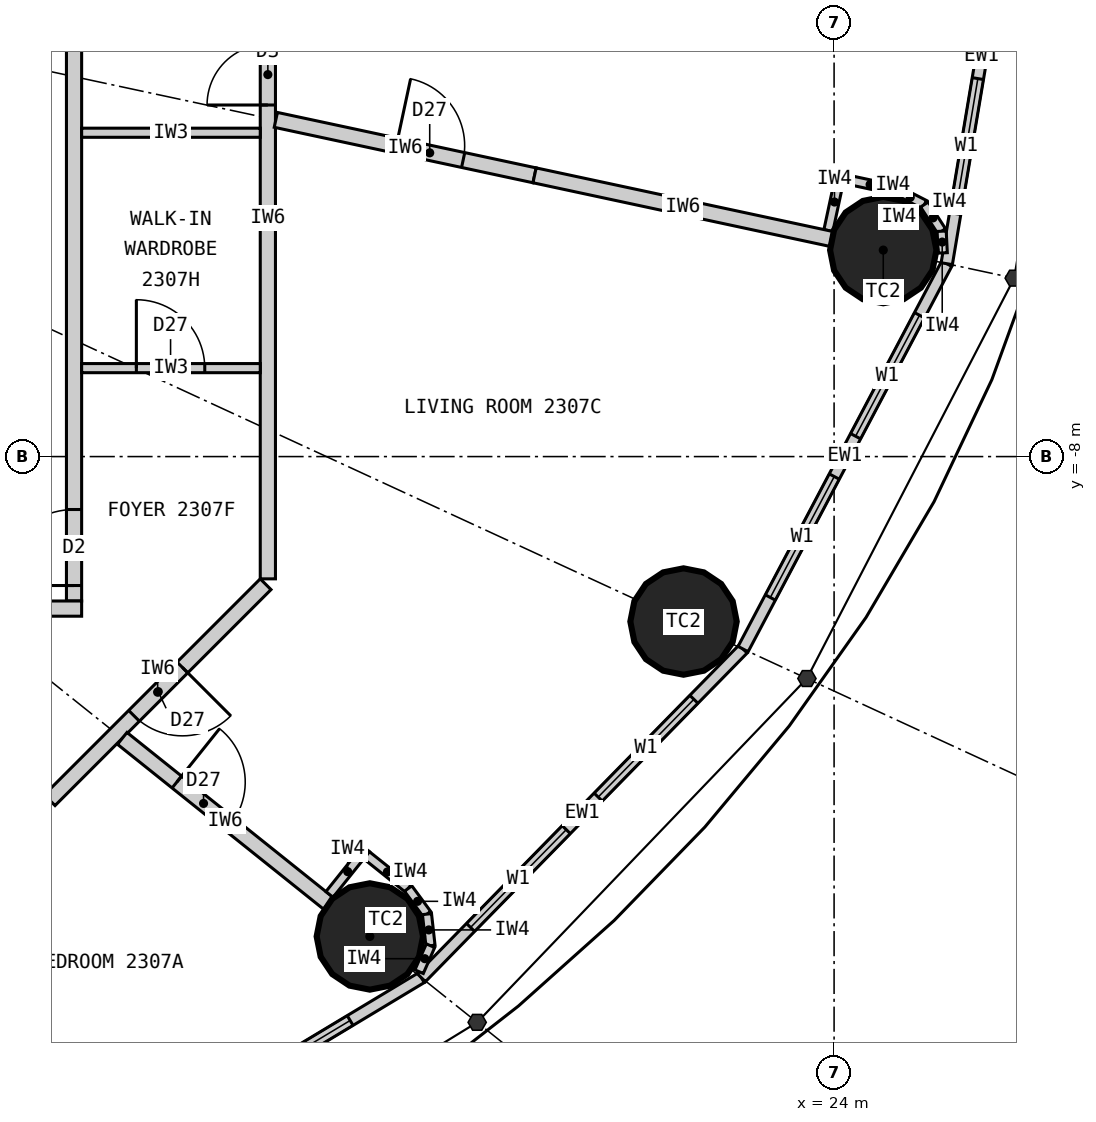
"""IFC4 building model, lengths in metres.
Left out: names, types, materials, properties, quantities, classifications, styles, units other than length and angle.
Written with IfcOpenShell. Run it as: python <this file> out.ifc"""

import sys

from ifc_helpers import new_model, si_unit, direction, frame, frame_2d, origin, origin_2d, place, context, subcontext, project, spatial, rectangle, circle, extrude, clip, halfspace, element, fill, save


model = new_model("IFC4")
c1 = context("Model", 3, precision=1e-05, world=origin(), true_north=direction((0.0, 1.0)))
c2 = subcontext(c1, "Body", "Model", "MODEL_VIEW")
j1 = project(units=[si_unit("LENGTHUNIT", "METRE"), si_unit("PLANEANGLEUNIT", "RADIAN")], contexts=[c1])
p1 = place(None, origin())
s1 = spatial("IfcSite", under=j1, at=p1, CompositionType="ELEMENT")
p2 = place(p1, origin())
s2 = spatial("IfcBuilding", under=s1, at=p2, CompositionType="ELEMENT")
p3 = place(p2, frame((0.0, 0.0, 90.3)))
s3 = spatial("IfcBuildingStorey", under=s2, at=p3, CompositionType="ELEMENT", Elevation=90.3)
for number, where, z_axis, x_axis in (
    (1, (17.892, -14.313, 0.0), (0.0, 0.0, 1.0), (1.0, 0.0, 0.0)),
    (2, (22.019, -10.17, 0.0), (0.0, 0.0, 1.0), (1.0, 0.0, 0.0)),
    (3, (24.647, -5.283, 0.0), (0.0, 0.0, 1.0), (1.0, 0.0, 0.0)),
):
    element("IfcColumn", number, at=place(p3, frame(where, z_axis=z_axis, x_axis=x_axis)), inside=s3, PredefinedType="COLUMN", context=c2, shape_type="Clipping", body=[
        clip(extrude(circle(Radius=0.7, at=origin_2d()), origin(), (0.0, 0.0, 1.0), 3.3), halfspace(frame((0.0, 0.0, 2.25), z_axis=(0.0, 0.0, 1.0), x_axis=(1.0, 0.0, 0.0)), False)),
    ])
p4 = place(p3, frame((13.096, -18.147, 0.0), z_axis=(0.0, 0.0, 1.0), x_axis=(0.856983180864, 0.515344377787, 0.0)))
e4 = element("IfcWall", 4, at=p4, inside=s3, PredefinedType="ELEMENTEDWALL", context=c2, shape_type="SweptSolid", body=[
    extrude(rectangle(XDim=6.386, YDim=0.15, at=frame_2d((3.193, 0.0))), origin(), (0.0, 0.0, 1.0), 3.05),
])
p5 = place(p4, frame((1.093, 0.0, 0.9)))
e5 = element("IfcOpeningElement", 5, at=p5, cuts=e4, PredefinedType="OPENING", context=c2, shape_type="SweptSolid", body=[
    extrude(rectangle(XDim=1.8, YDim=1.9, at=frame_2d((0.9, 0.95))), frame((0.0, 0.085, 0.0), z_axis=(0.0, -1.0, 0.0), x_axis=(1.0, 0.0, 0.0)), (0.0, 0.0, 1.0), 0.17),
])
p6 = place(p4, frame((3.493, 0.0, 0.9)))
e6 = element("IfcOpeningElement", 6, at=p6, cuts=e4, PredefinedType="OPENING", context=c2, shape_type="SweptSolid", body=[
    extrude(rectangle(XDim=1.8, YDim=1.9, at=frame_2d((0.9, 0.95))), frame((0.0, 0.085, 0.0), z_axis=(0.0, -1.0, 0.0), x_axis=(1.0, 0.0, 0.0)), (0.0, 0.0, 1.0), 0.17),
])
p7 = place(p3, frame((18.57, -14.856, 0.0), z_axis=(0.0, 0.0, 1.0), x_axis=(0.699602905915, 0.714531856557, 0.0)))
e7 = element("IfcWall", 7, at=p7, inside=s3, PredefinedType="ELEMENTEDWALL", context=c2, shape_type="SweptSolid", body=[
    extrude(rectangle(XDim=6.051, YDim=0.15, at=frame_2d((3.025, 0.0))), origin(), (0.0, 0.0, 1.0), 3.05),
])
p8 = place(p7, frame((0.926, 0.0, 0.9)))
e8 = element("IfcOpeningElement", 8, at=p8, cuts=e7, PredefinedType="OPENING", context=c2, shape_type="SweptSolid", body=[
    extrude(rectangle(XDim=1.8, YDim=1.9, at=frame_2d((0.9, 0.95))), frame((0.0, 0.085, 0.0), z_axis=(0.0, -1.0, 0.0), x_axis=(1.0, 0.0, 0.0)), (0.0, 0.0, 1.0), 0.17),
])
p9 = place(p7, frame((3.325, 0.0, 0.9)))
e9 = element("IfcOpeningElement", 9, at=p9, cuts=e7, PredefinedType="OPENING", context=c2, shape_type="SweptSolid", body=[
    extrude(rectangle(XDim=1.8, YDim=1.9, at=frame_2d((0.9, 0.95))), frame((0.0, 0.085, 0.0), z_axis=(0.0, -1.0, 0.0), x_axis=(1.0, 0.0, 0.0)), (0.0, 0.0, 1.0), 0.17),
])
p10 = place(p3, frame((22.803, -10.532, 0.0), z_axis=(0.0, 0.0, 1.0), x_axis=(0.467296867008, 0.884100468321, 0.0)))
e10 = element("IfcWall", 10, at=p10, inside=s3, PredefinedType="ELEMENTEDWALL", context=c2, shape_type="SweptSolid", body=[
    extrude(rectangle(XDim=5.734, YDim=0.15, at=frame_2d((2.867, 0.0))), origin(), (0.0, 0.0, 1.0), 3.05),
])
p11 = place(p10, frame((0.767, 0.0, 0.9)))
e11 = element("IfcOpeningElement", 11, at=p11, cuts=e10, PredefinedType="OPENING", context=c2, shape_type="SweptSolid", body=[
    extrude(rectangle(XDim=1.8, YDim=1.9, at=frame_2d((0.9, 0.95))), frame((0.0, 0.085, 0.0), z_axis=(0.0, -1.0, 0.0), x_axis=(1.0, 0.0, 0.0)), (0.0, 0.0, 1.0), 0.17),
])
p12 = place(p10, frame((3.167, 0.0, 0.9)))
e12 = element("IfcOpeningElement", 12, at=p12, cuts=e10, PredefinedType="OPENING", context=c2, shape_type="SweptSolid", body=[
    extrude(rectangle(XDim=1.8, YDim=1.9, at=frame_2d((0.9, 0.95))), frame((0.0, 0.085, 0.0), z_axis=(0.0, -1.0, 0.0), x_axis=(1.0, 0.0, 0.0)), (0.0, 0.0, 1.0), 0.17),
])
p13 = place(p3, frame((25.482, -5.462, 0.0), z_axis=(0.0, 0.0, 1.0), x_axis=(0.165642551694, 0.986185857264, 0.0)))
e13 = element("IfcWall", 13, at=p13, inside=s3, PredefinedType="ELEMENTEDWALL", context=c2, shape_type="SweptSolid", body=[
    extrude(rectangle(XDim=5.539, YDim=0.15, at=frame_2d((2.77, 0.0))), origin(), (0.0, 0.0, 1.0), 3.05),
])
p14 = place(p13, frame((0.669, 0.0, 0.9)))
e14 = element("IfcOpeningElement", 14, at=p14, cuts=e13, PredefinedType="OPENING", context=c2, shape_type="SweptSolid", body=[
    extrude(rectangle(XDim=1.8, YDim=1.9, at=frame_2d((0.9, 0.95))), frame((0.0, 0.085, 0.0), z_axis=(0.0, -1.0, 0.0), x_axis=(1.0, 0.0, 0.0)), (0.0, 0.0, 1.0), 0.17),
])
p15 = place(p13, frame((3.07, 0.0, 0.9)))
e15 = element("IfcOpeningElement", 15, at=p15, cuts=e13, PredefinedType="OPENING", context=c2, shape_type="SweptSolid", body=[
    extrude(rectangle(XDim=1.8, YDim=1.9, at=frame_2d((0.9, 0.95))), frame((0.0, 0.085, 0.0), z_axis=(0.0, -1.0, 0.0), x_axis=(1.0, 0.0, 0.0)), (0.0, 0.0, 1.0), 0.17),
])
p16 = place(p3, frame((14.0, -9.9, 0.0), z_axis=(0.0, 0.0, 1.0), x_axis=(0.0, 1.0, 0.0)))
e16 = element("IfcWall", 16, at=p16, inside=s3, PredefinedType="PARTITIONING", context=c2, shape_type="SweptSolid", body=[
    extrude(rectangle(XDim=19.8, YDim=0.2, at=frame_2d((9.9, 0.0))), origin(), (0.0, 0.0, 1.0), 3.05),
])
p17 = place(p16, frame((0.204, 0.0, 0.0)))
e17 = element("IfcOpeningElement", 17, at=p17, cuts=e16, PredefinedType="OPENING", context=c2, shape_type="SweptSolid", body=[
    extrude(rectangle(XDim=1.0, YDim=2.2, at=frame_2d((0.5, 1.1))), frame((0.0, 0.11, 0.0), z_axis=(0.0, -1.0, 0.0), x_axis=(1.0, 0.0, 0.0)), (0.0, 0.0, 1.0), 0.22),
])
p18 = place(p16, frame((13.715, 0.0, 0.0)))
e18 = element("IfcOpeningElement", 18, at=p18, cuts=e16, PredefinedType="OPENING", context=c2, shape_type="SweptSolid", body=[
    extrude(rectangle(XDim=1.0, YDim=2.2, at=frame_2d((0.5, 1.1))), frame((0.0, 0.11, 0.0), z_axis=(0.0, -1.0, 0.0), x_axis=(1.0, 0.0, 0.0)), (0.0, 0.0, 1.0), 0.22),
])
p19 = place(p16, frame((18.698, 0.0, 0.0)))
e19 = element("IfcOpeningElement", 19, at=p19, cuts=e16, PredefinedType="OPENING", context=c2, shape_type="SweptSolid", body=[
    extrude(rectangle(XDim=1.0, YDim=2.2, at=frame_2d((0.5, 1.1))), frame((0.0, 0.11, 0.0), z_axis=(0.0, -1.0, 0.0), x_axis=(1.0, 0.0, 0.0)), (0.0, 0.0, 1.0), 0.22),
])
p20 = place(p3, frame((13.679, -12.521, 0.0), z_axis=(0.0, 0.0, 1.0), x_axis=(0.707106781187, 0.707106781187, 0.0)))
e20 = element("IfcWall", 20, at=p20, inside=s3, PredefinedType="PARTITIONING", context=c2, shape_type="SweptSolid", body=[
    extrude(rectangle(XDim=4.019, YDim=0.2, at=frame_2d((2.009, 0.0))), origin(), (0.0, 0.0, 1.0), 3.05),
])
p21 = place(p20, frame((1.57, 0.0, 0.0)))
e21 = element("IfcOpeningElement", 21, at=p21, cuts=e20, PredefinedType="OPENING", context=c2, shape_type="SweptSolid", body=[
    extrude(rectangle(XDim=0.9, YDim=2.1, at=frame_2d((0.45, 1.05))), frame((0.0, 0.11, 0.0), z_axis=(0.0, -1.0, 0.0), x_axis=(1.0, 0.0, 0.0)), (0.0, 0.0, 1.0), 0.22),
])
p22 = place(p3, frame((16.55, -9.609, 0.0), z_axis=(0.0, 0.0, 1.0), x_axis=(0.0, 1.0, 0.0)))
e22 = element("IfcWall", 22, at=p22, inside=s3, PredefinedType="PARTITIONING", context=c2, shape_type="SweptSolid", body=[
    extrude(rectangle(XDim=9.508, YDim=0.2, at=frame_2d((4.754, 0.0))), origin(), (0.0, 0.0, 1.0), 3.05),
])
p23 = place(p22, frame((6.234, 0.0, 0.0)))
e23 = element("IfcOpeningElement", 23, at=p23, cuts=e22, PredefinedType="OPENING", context=c2, shape_type="SweptSolid", body=[
    extrude(rectangle(XDim=0.8, YDim=2.1, at=frame_2d((0.4, 1.05))), frame((0.0, 0.11, 0.0), z_axis=(0.0, -1.0, 0.0), x_axis=(1.0, 0.0, 0.0)), (0.0, 0.0, 1.0), 0.22),
])
p24 = place(p3, frame((14.634, -11.707, 0.0), z_axis=(0.0, 0.0, 1.0), x_axis=(0.780903110683, -0.624652168591, 0.0)))
e24 = element("IfcWall", 24, at=p24, inside=s3, PredefinedType="PARTITIONING", context=c2, shape_type="SweptSolid", body=[
    extrude(rectangle(XDim=3.472, YDim=0.2, at=frame_2d((1.736, 0.0))), origin(), (0.0, 0.0, 1.0), 2.25),
])
p25 = place(p24, frame((0.92, 0.0, 0.0)))
e25 = element("IfcOpeningElement", 25, at=p25, cuts=e24, PredefinedType="OPENING", context=c2, shape_type="SweptSolid", body=[
    extrude(rectangle(XDim=0.9, YDim=2.1, at=frame_2d((0.45, 1.05))), frame((0.0, 0.11, 0.0), z_axis=(0.0, -1.0, 0.0), x_axis=(1.0, 0.0, 0.0)), (0.0, 0.0, 1.0), 0.22),
])
p26 = place(p3, frame((16.655, -3.57, 0.0), z_axis=(0.0, 0.0, 1.0), x_axis=(0.977788045219, -0.209596132183, 0.0)))
e26 = element("IfcWall", 26, at=p26, inside=s3, PredefinedType="PARTITIONING", context=c2, shape_type="SweptSolid", body=[
    extrude(rectangle(XDim=3.482, YDim=0.2, at=frame_2d((1.741, 0.0))), origin(), (0.0, 0.0, 1.0), 3.05),
])
p27 = place(p26, frame((1.621, 0.0, 0.0)))
e27 = element("IfcOpeningElement", 27, at=p27, cuts=e26, PredefinedType="OPENING", context=c2, shape_type="SweptSolid", body=[
    extrude(rectangle(XDim=0.9, YDim=2.1, at=frame_2d((0.45, 1.05))), frame((0.0, 0.11, 0.0), z_axis=(0.0, -1.0, 0.0), x_axis=(1.0, 0.0, 0.0)), (0.0, 0.0, 1.0), 0.22),
])
p28 = place(p3, frame((14.1, -6.836, 0.0), z_axis=(0.0, 0.0, 1.0), x_axis=(1.0, 0.0, 0.0)))
e28 = element("IfcWall", 28, at=p28, inside=s3, PredefinedType="PARTITIONING", context=c2, shape_type="SweptSolid", body=[
    extrude(rectangle(XDim=2.35, YDim=0.12, at=frame_2d((1.175, 0.0))), origin(), (0.0, 0.0, 1.0), 3.05),
])
p29 = place(p28, frame((0.72, 0.0, 0.0)))
e29 = element("IfcOpeningElement", 29, at=p29, cuts=e28, PredefinedType="OPENING", context=c2, shape_type="SweptSolid", body=[
    extrude(rectangle(XDim=0.9, YDim=2.1, at=frame_2d((0.45, 1.05))), frame((0.0, 0.07, 0.0), z_axis=(0.0, -1.0, 0.0), x_axis=(1.0, 0.0, 0.0)), (0.0, 0.0, 1.0), 0.14),
])
p30 = place(p3, frame((14.1, -3.74, 0.0), z_axis=(0.0, 0.0, 1.0), x_axis=(1.0, 0.0, 0.0)))
e30 = element("IfcWall", 30, at=p30, inside=s3, PredefinedType="PARTITIONING", context=c2, shape_type="SweptSolid", body=[
    extrude(rectangle(XDim=2.35, YDim=0.12, at=frame_2d((1.175, 0.0))), origin(), (0.0, 0.0, 1.0), 2.05),
])
p31 = place(p3, frame((14.1, -10.0, 0.0), z_axis=(0.0, 0.0, 1.0), x_axis=(-1.0, 0.0, 0.0)))
e31 = element("IfcWall", 31, at=p31, inside=s3, PredefinedType="PARTITIONING", context=c2, shape_type="SweptSolid", body=[
    extrude(rectangle(XDim=24.429, YDim=0.2, at=frame_2d((12.215, 0.0))), origin(), (0.0, 0.0, 1.0), 3.05),
])
p32 = place(p31, frame((13.597, 0.0, 0.0)))
e32 = element("IfcOpeningElement", 32, at=p32, cuts=e31, PredefinedType="OPENING", context=c2, shape_type="SweptSolid", body=[
    extrude(rectangle(XDim=1.0, YDim=2.2, at=frame_2d((0.5, 1.1))), frame((0.0, 0.11, 0.0), z_axis=(0.0, -1.0, 0.0), x_axis=(1.0, 0.0, 0.0)), (0.0, 0.0, 1.0), 0.22),
])
p33 = place(p3, frame((17.361, -13.76, 0.0), z_axis=(0.0, 0.0, 1.0), x_axis=(0.624501042889, 0.781023973659, 0.0)))
e33 = element("IfcWall", 33, at=p33, inside=s3, PredefinedType="PARTITIONING", context=c2, shape_type="SweptSolid", body=[
    extrude(rectangle(XDim=0.767, YDim=0.12, at=frame_2d((0.384, 0.0))), origin(), (0.0, 0.0, 1.0), 3.05),
])
p34 = place(p3, frame((17.85, -13.246, 0.0), z_axis=(0.0, 0.0, 1.0), x_axis=(0.780902834923, -0.62465251333, 0.0)))
e34 = element("IfcWall", 34, at=p34, inside=s3, PredefinedType="PARTITIONING", context=c2, shape_type="SweptSolid", body=[
    extrude(rectangle(XDim=0.7, YDim=0.12, at=frame_2d((0.35, 0.0))), origin(), (0.0, 0.0, 1.0), 3.05),
])
for number, where, z_axis, x_axis in (
    (35, (18.396, -13.683, 0.0), (0.0, 0.0, 1.0), (0.592, -0.806, 0.0)),
    (36, (18.644, -14.02, 0.0), (0.0, 0.0, 1.0), (0.11, -0.994, 0.0)),
):
    element("IfcWall", number, at=place(p3, frame(where, z_axis=z_axis, x_axis=x_axis)), inside=s3, PredefinedType="PARTITIONING", context=c2, shape_type="SweptSolid", body=[
        extrude(rectangle(XDim=0.418, YDim=0.12, at=frame_2d((0.209, 0.0))), origin(), (0.0, 0.0, 1.0), 3.05),
    ])
p35 = place(p3, frame((18.69, -14.435, 0.0), z_axis=(0.0, 0.0, 1.0), x_axis=(-0.401093412634, -0.91603715773, 0.0)))
e37 = element("IfcWall", 37, at=p35, inside=s3, PredefinedType="PARTITIONING", context=c2, shape_type="SweptSolid", body=[
    extrude(rectangle(XDim=0.373, YDim=0.12, at=frame_2d((0.187, 0.0))), origin(), (0.0, 0.0, 1.0), 3.05),
])
p36 = place(p3, frame((23.925, -5.026, 0.0), z_axis=(0.0, 0.0, 1.0), x_axis=(0.209681192172, 0.977769808109, 0.0)))
e38 = element("IfcWall", 38, at=p36, inside=s3, PredefinedType="PARTITIONING", context=c2, shape_type="SweptSolid", body=[
    extrude(rectangle(XDim=0.767, YDim=0.12, at=frame_2d((0.384, 0.0))), origin(), (0.0, 0.0, 1.0), 3.05),
])
p37 = place(p3, frame((24.132, -4.347, 0.0), z_axis=(0.0, 0.0, 1.0), x_axis=(0.977776882509, -0.209648200638, 0.0)))
e39 = element("IfcWall", 39, at=p37, inside=s3, PredefinedType="PARTITIONING", context=c2, shape_type="SweptSolid", body=[
    extrude(rectangle(XDim=0.7, YDim=0.12, at=frame_2d((0.35, 0.0))), origin(), (0.0, 0.0, 1.0), 3.05),
])
for number, where, z_axis, x_axis in (
    (40, (24.816, -4.494, 0.0), (0.0, 0.0, 1.0), (0.89, -0.455, 0.0)),
    (41, (25.188, -4.684, 0.0), (0.0, 0.0, 1.0), (0.543, -0.84, 0.0)),
):
    element("IfcWall", number, at=place(p3, frame(where, z_axis=z_axis, x_axis=x_axis)), inside=s3, PredefinedType="PARTITIONING", context=c2, shape_type="SweptSolid", body=[
        extrude(rectangle(XDim=0.418, YDim=0.12, at=frame_2d((0.209, 0.0))), origin(), (0.0, 0.0, 1.0), 3.05),
    ])
p38 = place(p3, frame((25.416, -5.035, 0.0), z_axis=(0.0, 0.0, 1.0), x_axis=(0.050406329159, -0.998728793007, 0.0)))
e42 = element("IfcWall", 42, at=p38, inside=s3, PredefinedType="PARTITIONING", context=c2, shape_type="SweptSolid", body=[
    extrude(rectangle(XDim=0.286, YDim=0.12, at=frame_2d((0.143, 0.0))), origin(), (0.0, 0.0, 1.0), 3.05),
])
p39 = place(p3, frame((20.059, -4.3, 0.0), z_axis=(0.0, 0.0, 1.0), x_axis=(0.977792568683, -0.209575028637, 0.0)))
e43 = element("IfcWall", 43, at=p39, inside=s3, PredefinedType="PARTITIONING", context=c2, shape_type="SweptSolid", body=[
    extrude(rectangle(XDim=3.992, YDim=0.2, at=frame_2d((1.996, 0.0))), origin(), (0.0, 0.0, 1.0), 2.05),
])
p40 = place(p6, origin())
e44 = element("IfcWindow", 44, at=p40, inside=s3, PartitioningType="SINGLE_PANEL", PredefinedType="WINDOW", context=c2, shape_type="SweptSolid", body=[
    extrude(rectangle(XDim=1.8, YDim=1.9, at=frame_2d((0.9, 0.95))), frame((0.0, 0.03, 0.0), z_axis=(0.0, -1.0, 0.0), x_axis=(1.0, 0.0, 0.0)), (0.0, 0.0, 1.0), 0.06),
])
fill(e6, e44)
p41 = place(p8, origin())
e45 = element("IfcWindow", 45, at=p41, inside=s3, PartitioningType="SINGLE_PANEL", PredefinedType="WINDOW", context=c2, shape_type="SweptSolid", body=[
    extrude(rectangle(XDim=1.8, YDim=1.9, at=frame_2d((0.9, 0.95))), frame((0.0, 0.03, 0.0), z_axis=(0.0, -1.0, 0.0), x_axis=(1.0, 0.0, 0.0)), (0.0, 0.0, 1.0), 0.06),
])
fill(e8, e45)
p42 = place(p9, origin())
e46 = element("IfcWindow", 46, at=p42, inside=s3, PartitioningType="SINGLE_PANEL", PredefinedType="WINDOW", context=c2, shape_type="SweptSolid", body=[
    extrude(rectangle(XDim=1.8, YDim=1.9, at=frame_2d((0.9, 0.95))), frame((0.0, 0.03, 0.0), z_axis=(0.0, -1.0, 0.0), x_axis=(1.0, 0.0, 0.0)), (0.0, 0.0, 1.0), 0.06),
])
fill(e9, e46)
p43 = place(p11, origin())
e47 = element("IfcWindow", 47, at=p43, inside=s3, PartitioningType="SINGLE_PANEL", PredefinedType="WINDOW", context=c2, shape_type="SweptSolid", body=[
    extrude(rectangle(XDim=1.8, YDim=1.9, at=frame_2d((0.9, 0.95))), frame((0.0, 0.03, 0.0), z_axis=(0.0, -1.0, 0.0), x_axis=(1.0, 0.0, 0.0)), (0.0, 0.0, 1.0), 0.06),
])
fill(e11, e47)
p44 = place(p12, origin())
e48 = element("IfcWindow", 48, at=p44, inside=s3, PartitioningType="SINGLE_PANEL", PredefinedType="WINDOW", context=c2, shape_type="SweptSolid", body=[
    extrude(rectangle(XDim=1.8, YDim=1.9, at=frame_2d((0.9, 0.95))), frame((0.0, 0.03, 0.0), z_axis=(0.0, -1.0, 0.0), x_axis=(1.0, 0.0, 0.0)), (0.0, 0.0, 1.0), 0.06),
])
fill(e12, e48)
p45 = place(p14, origin())
e49 = element("IfcWindow", 49, at=p45, inside=s3, PartitioningType="SINGLE_PANEL", PredefinedType="WINDOW", context=c2, shape_type="SweptSolid", body=[
    extrude(rectangle(XDim=1.8, YDim=1.9, at=frame_2d((0.9, 0.95))), frame((0.0, 0.03, 0.0), z_axis=(0.0, -1.0, 0.0), x_axis=(1.0, 0.0, 0.0)), (0.0, 0.0, 1.0), 0.06),
])
fill(e14, e49)
p46 = place(p17, origin())
e50 = element("IfcDoor", 50, at=p46, inside=s3, OperationType="SINGLE_SWING_LEFT", PredefinedType="DOOR", context=c2, shape_type="SweptSolid", body=[
    extrude(rectangle(XDim=1.0, YDim=2.2, at=frame_2d((0.5, 1.1))), frame((0.0, 0.025, 0.0), z_axis=(0.0, -1.0, 0.0), x_axis=(1.0, 0.0, 0.0)), (0.0, 0.0, 1.0), 0.05),
])
fill(e17, e50)
p47 = place(p29, origin())
e51 = element("IfcDoor", 51, at=p47, inside=s3, OperationType="SINGLE_SWING_LEFT", PredefinedType="DOOR", context=c2, shape_type="SweptSolid", body=[
    extrude(rectangle(XDim=0.9, YDim=2.1, at=frame_2d((0.45, 1.05))), frame((0.0, 0.025, 0.0), z_axis=(0.0, -1.0, 0.0), x_axis=(1.0, 0.0, 0.0)), (0.0, 0.0, 1.0), 0.05),
])
fill(e29, e51)
p48 = place(p23, origin())
e52 = element("IfcDoor", 52, at=p48, inside=s3, OperationType="SINGLE_SWING_LEFT", PredefinedType="DOOR", context=c2, shape_type="SweptSolid", body=[
    extrude(rectangle(XDim=0.8, YDim=2.1, at=frame_2d((0.4, 1.05))), frame((0.0, 0.025, 0.0), z_axis=(0.0, -1.0, 0.0), x_axis=(1.0, 0.0, 0.0)), (0.0, 0.0, 1.0), 0.05),
])
fill(e23, e52)
p49 = place(p21, origin())
e53 = element("IfcDoor", 53, at=p49, inside=s3, OperationType="SINGLE_SWING_RIGHT", PredefinedType="DOOR", context=c2, shape_type="SweptSolid", body=[
    extrude(rectangle(XDim=0.9, YDim=2.1, at=frame_2d((0.45, 1.05))), frame((0.0, 0.025, 0.0), z_axis=(0.0, -1.0, 0.0), x_axis=(1.0, 0.0, 0.0)), (0.0, 0.0, 1.0), 0.05),
])
fill(e21, e53)
p50 = place(p25, origin())
e54 = element("IfcDoor", 54, at=p50, inside=s3, OperationType="SINGLE_SWING_LEFT", PredefinedType="DOOR", context=c2, shape_type="SweptSolid", body=[
    extrude(rectangle(XDim=0.9, YDim=2.1, at=frame_2d((0.45, 1.05))), frame((0.0, 0.025, 0.0), z_axis=(0.0, -1.0, 0.0), x_axis=(1.0, 0.0, 0.0)), (0.0, 0.0, 1.0), 0.05),
])
fill(e25, e54)
p51 = place(p27, origin())
e55 = element("IfcDoor", 55, at=p51, inside=s3, OperationType="SINGLE_SWING_LEFT", PredefinedType="DOOR", context=c2, shape_type="SweptSolid", body=[
    extrude(rectangle(XDim=0.9, YDim=2.1, at=frame_2d((0.45, 1.05))), frame((0.0, 0.025, 0.0), z_axis=(0.0, -1.0, 0.0), x_axis=(1.0, 0.0, 0.0)), (0.0, 0.0, 1.0), 0.05),
])
fill(e27, e55)
save(model, sys.argv[1])
